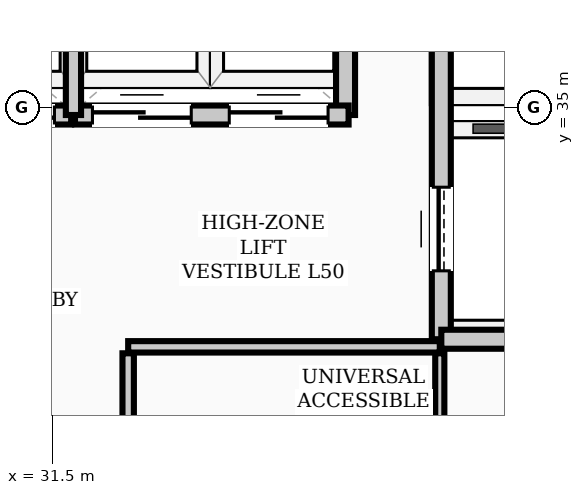
"""IFC4 building model, lengths in metres.
Left out: names, types, materials, properties, quantities, classifications, styles, units other than length and angle.
Written with IfcOpenShell. Run it as: python <this file> out.ifc"""

import sys

from ifc_helpers import new_model, si_unit, direction, frame, frame_2d, origin, place, context, subcontext, project, spatial, rectangle, extrude, element, fill, save


model = new_model("IFC4")
c1 = context("Model", 3, precision=1e-05, world=origin(), true_north=direction((0.0, 1.0)))
c2 = subcontext(c1, "Body", "Model", "MODEL_VIEW")
j1 = project(units=[si_unit("LENGTHUNIT", "METRE"), si_unit("PLANEANGLEUNIT", "RADIAN")], contexts=[c1])
p1 = place(None, origin())
s1 = spatial("IfcSite", under=j1, at=p1, CompositionType="ELEMENT")
p2 = place(p1, origin())
s2 = spatial("IfcBuilding", under=s1, at=p2, CompositionType="ELEMENT")
p3 = place(p2, frame((0.0, 0.0, 200.7)))
s3 = spatial("IfcBuildingStorey", under=s2, at=p3, CompositionType="ELEMENT", Elevation=200.7)
p4 = place(p3, frame((36.62, 31.95, 0.0), z_axis=(0.0, 0.0, 1.0), x_axis=(0.0, 1.0, 0.0)))
e1 = element("IfcWall", 1, at=p4, inside=s3, PredefinedType="STANDARD", context=c2, shape_type="SweptSolid", body=[
    extrude(rectangle(XDim=6.0, YDim=0.25, at=frame_2d((3.0, 0.0))), origin(), (0.0, 0.0, 1.0), 5.22),
])
p5 = place(p4, frame((0.9, 0.0, 0.0)))
e2 = element("IfcOpeningElement", 2, at=p5, cuts=e1, PredefinedType="OPENING", context=c2, shape_type="SweptSolid", body=[
    extrude(rectangle(XDim=1.1, YDim=2.08, at=frame_2d((0.55, 1.04))), frame((0.0, 0.135, 0.0), z_axis=(0.0, -1.0, 0.0), x_axis=(1.0, 0.0, 0.0)), (0.0, 0.0, 1.0), 0.27),
])
p6 = place(p4, frame((4.0, 0.0, 0.0)))
e3 = element("IfcOpeningElement", 3, at=p6, cuts=e1, PredefinedType="OPENING", context=c2, shape_type="SweptSolid", body=[
    extrude(rectangle(XDim=1.1, YDim=2.08, at=frame_2d((0.55, 1.04))), frame((0.0, 0.135, 0.0), z_axis=(0.0, -1.0, 0.0), x_axis=(1.0, 0.0, 0.0)), (0.0, 0.0, 1.0), 0.27),
])
p7 = place(p3, frame((36.62, 31.95, 0.0), z_axis=(0.0, 0.0, 1.0), x_axis=(1.0, 0.0, 0.0)))
e4 = element("IfcWall", 4, at=p7, inside=s3, PredefinedType="STANDARD", context=c2, shape_type="SweptSolid", body=[
    extrude(rectangle(XDim=1.9, YDim=0.25, at=frame_2d((0.95, 0.0))), origin(), (0.0, 0.0, 1.0), 4.98),
])
p8 = place(p3, frame((35.36, 34.9, 0.0), z_axis=(0.0, 0.0, 1.0), x_axis=(0.0, 1.0, 0.0)))
e5 = element("IfcWall", 5, at=p8, inside=s3, PredefinedType="STANDARD", context=c2, shape_type="SweptSolid", body=[
    extrude(rectangle(XDim=3.05, YDim=0.25, at=frame_2d((1.525, 0.0))), origin(), (0.0, 0.0, 1.0), 5.22),
])
p9 = place(p3, frame((28.2, 34.9, 0.0), z_axis=(0.0, 0.0, 1.0), x_axis=(1.0, 0.0, 0.0)))
e6 = element("IfcWall", 6, at=p9, inside=s3, PredefinedType="STANDARD", context=c2, shape_type="SweptSolid", body=[
    extrude(rectangle(XDim=3.55, YDim=0.25, at=frame_2d((1.775, 0.0))), origin(), (0.0, 0.0, 1.0), 5.22),
])
p10 = place(p9, frame((0.23, 0.0, 0.0)))
e7 = element("IfcOpeningElement", 7, at=p10, cuts=e6, PredefinedType="OPENING", context=c2, shape_type="SweptSolid", body=[
    extrude(rectangle(XDim=1.3, YDim=2.08, at=frame_2d((0.65, 1.04))), frame((0.0, 0.135, 0.0), z_axis=(0.0, -1.0, 0.0), x_axis=(1.0, 0.0, 0.0)), (0.0, 0.0, 1.0), 0.27),
])
p11 = place(p9, frame((2.03, 0.0, 0.0)))
e8 = element("IfcOpeningElement", 8, at=p11, cuts=e6, PredefinedType="OPENING", context=c2, shape_type="SweptSolid", body=[
    extrude(rectangle(XDim=1.3, YDim=2.08, at=frame_2d((0.65, 1.04))), frame((0.0, 0.135, 0.0), z_axis=(0.0, -1.0, 0.0), x_axis=(1.0, 0.0, 0.0)), (0.0, 0.0, 1.0), 0.27),
])
p12 = place(p3, frame((31.8, 34.9, 0.0), z_axis=(0.0, 0.0, 1.0), x_axis=(1.0, 0.0, 0.0)))
e9 = element("IfcWall", 9, at=p12, inside=s3, PredefinedType="STANDARD", context=c2, shape_type="SweptSolid", body=[
    extrude(rectangle(XDim=3.6, YDim=0.25, at=frame_2d((1.8, 0.0))), origin(), (0.0, 0.0, 1.0), 5.22),
])
p13 = place(p12, frame((0.23, 0.0, 0.0)))
e10 = element("IfcOpeningElement", 10, at=p13, cuts=e9, PredefinedType="OPENING", context=c2, shape_type="SweptSolid", body=[
    extrude(rectangle(XDim=1.3, YDim=2.08, at=frame_2d((0.65, 1.04))), frame((0.0, 0.135, 0.0), z_axis=(0.0, -1.0, 0.0), x_axis=(1.0, 0.0, 0.0)), (0.0, 0.0, 1.0), 0.27),
])
p14 = place(p12, frame((2.03, 0.0, 0.0)))
e11 = element("IfcOpeningElement", 11, at=p14, cuts=e9, PredefinedType="OPENING", context=c2, shape_type="SweptSolid", body=[
    extrude(rectangle(XDim=1.3, YDim=2.08, at=frame_2d((0.65, 1.04))), frame((0.0, 0.135, 0.0), z_axis=(0.0, -1.0, 0.0), x_axis=(1.0, 0.0, 0.0)), (0.0, 0.0, 1.0), 0.27),
])
p15 = place(p3, frame((32.5, 31.85, 0.0), z_axis=(0.0, 0.0, 1.0), x_axis=(1.0, 0.0, 0.0)))
e12 = element("IfcWall", 12, at=p15, inside=s3, PredefinedType="PARTITIONING", context=c2, shape_type="SweptSolid", body=[
    extrude(rectangle(XDim=4.1, YDim=0.15, at=frame_2d((2.05, 0.0))), origin(), (0.0, 0.0, 1.0), 5.22),
])
p16 = place(p3, frame((32.5, 29.235, 0.0), z_axis=(0.0, 0.0, 1.0), x_axis=(0.0, 1.0, 0.0)))
e13 = element("IfcWall", 13, at=p16, inside=s3, PredefinedType="PARTITIONING", context=c2, shape_type="SweptSolid", body=[
    extrude(rectangle(XDim=2.53, YDim=0.15, at=frame_2d((1.265, 0.0))), origin(), (0.0, 0.0, 1.0), 4.85),
])
p17 = place(p3, frame((36.6, 29.235, 0.0), z_axis=(0.0, 0.0, 1.0), x_axis=(0.0, 1.0, 0.0)))
e14 = element("IfcWall", 14, at=p17, inside=s3, PredefinedType="PARTITIONING", context=c2, shape_type="SweptSolid", body=[
    extrude(rectangle(XDim=2.53, YDim=0.12, at=frame_2d((1.265, 0.0))), origin(), (0.0, 0.0, 1.0), 4.85),
])
p18 = place(p3, frame((31.78, 34.9, 0.0), z_axis=(0.0, 0.0, 1.0), x_axis=(0.0, 1.0, 0.0)))
e15 = element("IfcWall", 15, at=p18, inside=s3, PredefinedType="STANDARD", context=c2, shape_type="SweptSolid", body=[
    extrude(rectangle(XDim=3.12, YDim=0.2, at=frame_2d((1.56, 0.0))), origin(), (0.0, 0.0, 1.0), 5.22),
])
p19 = place(p5, origin())
e16 = element("IfcDoor", 16, at=p19, inside=s3, OperationType="SLIDING_TO_LEFT", PredefinedType="DOOR", context=c2, shape_type="SweptSolid", body=[
    extrude(rectangle(XDim=1.1, YDim=2.08, at=frame_2d((0.55, 1.04))), frame((0.0, 0.025, 0.0), z_axis=(0.0, -1.0, 0.0), x_axis=(1.0, 0.0, 0.0)), (0.0, 0.0, 1.0), 0.05),
])
fill(e2, e16)
p20 = place(p11, origin())
e17 = element("IfcDoor", 17, at=p20, inside=s3, OperationType="DOUBLE_DOOR_SLIDING", PredefinedType="DOOR", context=c2, shape_type="SweptSolid", body=[
    extrude(rectangle(XDim=1.3, YDim=2.08, at=frame_2d((0.65, 1.04))), frame((0.0, 0.025, 0.0), z_axis=(0.0, -1.0, 0.0), x_axis=(1.0, 0.0, 0.0)), (0.0, 0.0, 1.0), 0.05),
])
fill(e8, e17)
p21 = place(p13, origin())
e18 = element("IfcDoor", 18, at=p21, inside=s3, OperationType="DOUBLE_DOOR_SLIDING", PredefinedType="DOOR", context=c2, shape_type="SweptSolid", body=[
    extrude(rectangle(XDim=1.3, YDim=2.08, at=frame_2d((0.65, 1.04))), frame((0.0, 0.025, 0.0), z_axis=(0.0, -1.0, 0.0), x_axis=(1.0, 0.0, 0.0)), (0.0, 0.0, 1.0), 0.05),
])
fill(e10, e18)
p22 = place(p14, origin())
e19 = element("IfcDoor", 19, at=p22, inside=s3, OperationType="DOUBLE_DOOR_SLIDING", PredefinedType="DOOR", context=c2, shape_type="SweptSolid", body=[
    extrude(rectangle(XDim=1.3, YDim=2.08, at=frame_2d((0.65, 1.04))), frame((0.0, 0.025, 0.0), z_axis=(0.0, -1.0, 0.0), x_axis=(1.0, 0.0, 0.0)), (0.0, 0.0, 1.0), 0.05),
])
fill(e11, e19)
save(model, sys.argv[1])
